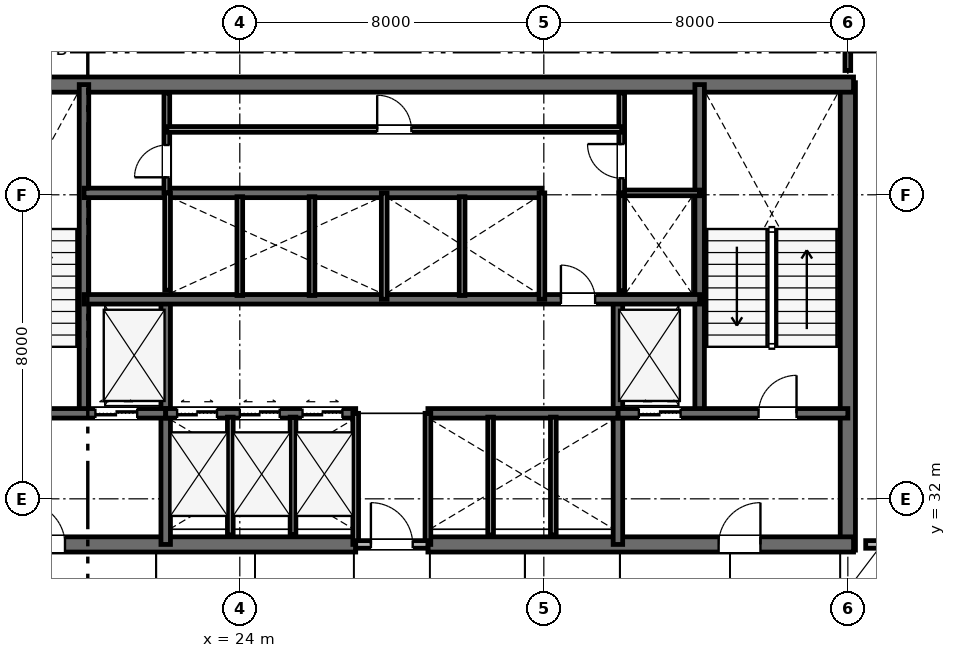
"""IFC4 building model, lengths in metres.
Left out: names, types, materials, properties, quantities, classifications, styles, units other than length and angle.
Written with IfcOpenShell. Run it as: python <this file> out.ifc"""

import sys

from ifc_helpers import new_model, si_unit, direction, frame, frame_2d, origin, place, context, subcontext, project, spatial, rectangle, extrude, element, fill, save


model = new_model("IFC4")
c1 = context("Model", 3, precision=1e-05, world=origin(), true_north=direction((0.0, 1.0)))
c2 = subcontext(c1, "Body", "Model", "MODEL_VIEW")
j1 = project(units=[si_unit("LENGTHUNIT", "METRE"), si_unit("PLANEANGLEUNIT", "RADIAN")], contexts=[c1])
p1 = place(None, origin())
s1 = spatial("IfcSite", under=j1, at=p1, CompositionType="ELEMENT")
p2 = place(p1, origin())
s2 = spatial("IfcBuilding", under=s1, at=p2, CompositionType="ELEMENT")
p3 = place(p2, frame((0.0, 0.0, 33.0)))
s3 = spatial("IfcBuildingStorey", under=s2, at=p3, CompositionType="ELEMENT", Elevation=33.0)
p4 = place(p3, frame((40.0, 30.65, 0.0), z_axis=(0.0, 0.0, 1.0), x_axis=(0.0, 1.0, 0.0)))
e1 = element("IfcWall", 1, at=p4, inside=s3, PredefinedType="SHEAR", context=c2, shape_type="SweptSolid", body=[
    extrude(rectangle(XDim=12.3, YDim=0.4, at=frame_2d((6.15, 0.0))), origin(), (0.0, 0.0, 1.0), 3.6),
])
p5 = place(p3, frame((15.85, 42.9, 0.0), z_axis=(0.0, 0.0, 1.0), x_axis=(1.0, 0.0, 0.0)))
e2 = element("IfcWall", 2, at=p5, inside=s3, PredefinedType="SHEAR", context=c2, shape_type="SweptSolid", body=[
    extrude(rectangle(XDim=24.3, YDim=0.4, at=frame_2d((12.15, 0.0))), origin(), (0.0, 0.0, 1.0), 3.6),
])
p6 = place(p3, frame((15.85, 30.8, 0.0), z_axis=(0.0, 0.0, 1.0), x_axis=(1.0, 0.0, 0.0)))
e3 = element("IfcWall", 3, at=p6, inside=s3, PredefinedType="SHEAR", context=c2, shape_type="SweptSolid", body=[
    extrude(rectangle(XDim=11.2, YDim=0.4, at=frame_2d((5.6, 0.0))), origin(), (0.0, 0.0, 1.0), 3.6),
])
p7 = place(p6, frame((2.45, 0.0, 0.0)))
e4 = element("IfcOpeningElement", 4, at=p7, cuts=e3, PredefinedType="OPENING", context=c2, shape_type="SweptSolid", body=[
    extrude(rectangle(XDim=1.1, YDim=2.15, at=frame_2d((0.55, 1.075))), frame((0.0, 0.21, 0.0), z_axis=(0.0, -1.0, 0.0), x_axis=(1.0, 0.0, 0.0)), (0.0, 0.0, 1.0), 0.42),
])
p8 = place(p3, frame((28.95, 30.8, 0.0), z_axis=(0.0, 0.0, 1.0), x_axis=(1.0, 0.0, 0.0)))
e5 = element("IfcWall", 5, at=p8, inside=s3, PredefinedType="SHEAR", context=c2, shape_type="SweptSolid", body=[
    extrude(rectangle(XDim=11.2, YDim=0.4, at=frame_2d((5.6, 0.0))), origin(), (0.0, 0.0, 1.0), 3.6),
])
p9 = place(p8, frame((7.65, 0.0, 0.0)))
e6 = element("IfcOpeningElement", 6, at=p9, cuts=e5, PredefinedType="OPENING", context=c2, shape_type="SweptSolid", body=[
    extrude(rectangle(XDim=1.1, YDim=2.15, at=frame_2d((0.55, 1.075))), frame((0.0, 0.21, 0.0), z_axis=(0.0, -1.0, 0.0), x_axis=(1.0, 0.0, 0.0)), (0.0, 0.0, 1.0), 0.42),
])
for number, where, z_axis, x_axis in (
    (7, (19.9, 34.25, 0.0), (0.0, 0.0, 1.0), (0.0, 1.0, 0.0)),
    (8, (36.1, 34.25, 0.0), (0.0, 0.0, 1.0), (0.0, 1.0, 0.0)),
):
    element("IfcWall", number, at=place(p3, frame(where, z_axis=z_axis, x_axis=x_axis)), inside=s3, PredefinedType="SHEAR", context=c2, shape_type="SweptSolid", body=[
        extrude(rectangle(XDim=8.65, YDim=0.25, at=frame_2d((4.325, 0.0))), origin(), (0.0, 0.0, 1.0), 3.6),
    ])
for number, where, z_axis, x_axis in (
    (9, (22.05, 30.8, 0.0), (0.0, 0.0, 1.0), (0.0, 1.0, 0.0)),
    (10, (33.95, 30.8, 0.0), (0.0, 0.0, 1.0), (0.0, 1.0, 0.0)),
):
    element("IfcWall", number, at=place(p3, frame(where, z_axis=z_axis, x_axis=x_axis)), inside=s3, PredefinedType="SHEAR", context=c2, shape_type="SweptSolid", body=[
        extrude(rectangle(XDim=6.45, YDim=0.25, at=frame_2d((3.225, 0.0))), origin(), (0.0, 0.0, 1.0), 3.6),
    ])
p10 = place(p3, frame((16.0, 34.25, 0.0), z_axis=(0.0, 0.0, 1.0), x_axis=(1.0, 0.0, 0.0)))
e11 = element("IfcWall", 11, at=p10, inside=s3, PredefinedType="SHEAR", context=c2, shape_type="SweptSolid", body=[
    extrude(rectangle(XDim=6.05, YDim=0.25, at=frame_2d((3.025, 0.0))), origin(), (0.0, 0.0, 1.0), 3.6),
])
p11 = place(p10, frame((1.25, 0.0, 0.0)))
e12 = element("IfcOpeningElement", 12, at=p11, cuts=e11, PredefinedType="OPENING", context=c2, shape_type="SweptSolid", body=[
    extrude(rectangle(XDim=1.0, YDim=2.15, at=frame_2d((0.5, 1.075))), frame((0.0, 0.135, 0.0), z_axis=(0.0, -1.0, 0.0), x_axis=(1.0, 0.0, 0.0)), (0.0, 0.0, 1.0), 0.27),
])
p12 = place(p10, frame((4.2, 0.0, 0.0)))
e13 = element("IfcOpeningElement", 13, at=p12, cuts=e11, PredefinedType="OPENING", context=c2, shape_type="SweptSolid", body=[
    extrude(rectangle(XDim=1.1, YDim=2.15, at=frame_2d((0.55, 1.075))), frame((0.0, 0.135, 0.0), z_axis=(0.0, -1.0, 0.0), x_axis=(1.0, 0.0, 0.0)), (0.0, 0.0, 1.0), 0.27),
])
p13 = place(p3, frame((33.95, 34.25, 0.0), z_axis=(0.0, 0.0, 1.0), x_axis=(1.0, 0.0, 0.0)))
e14 = element("IfcWall", 14, at=p13, inside=s3, PredefinedType="SHEAR", context=c2, shape_type="SweptSolid", body=[
    extrude(rectangle(XDim=6.05, YDim=0.25, at=frame_2d((3.025, 0.0))), origin(), (0.0, 0.0, 1.0), 3.6),
])
p14 = place(p13, frame((3.7, 0.0, 0.0)))
e15 = element("IfcOpeningElement", 15, at=p14, cuts=e14, PredefinedType="OPENING", context=c2, shape_type="SweptSolid", body=[
    extrude(rectangle(XDim=1.0, YDim=2.15, at=frame_2d((0.5, 1.075))), frame((0.0, 0.135, 0.0), z_axis=(0.0, -1.0, 0.0), x_axis=(1.0, 0.0, 0.0)), (0.0, 0.0, 1.0), 0.27),
])
p15 = place(p13, frame((0.55, 0.0, 0.0)))
e16 = element("IfcOpeningElement", 16, at=p15, cuts=e14, PredefinedType="OPENING", context=c2, shape_type="SweptSolid", body=[
    extrude(rectangle(XDim=1.1, YDim=2.15, at=frame_2d((0.55, 1.075))), frame((0.0, 0.135, 0.0), z_axis=(0.0, -1.0, 0.0), x_axis=(1.0, 0.0, 0.0)), (0.0, 0.0, 1.0), 0.27),
])
p16 = place(p3, frame((22.05, 34.25, 0.0), z_axis=(0.0, 0.0, 1.0), x_axis=(1.0, 0.0, 0.0)))
e17 = element("IfcWall", 17, at=p16, inside=s3, PredefinedType="SHEAR", context=c2, shape_type="SweptSolid", body=[
    extrude(rectangle(XDim=5.0, YDim=0.25, at=frame_2d((2.5, 0.0))), origin(), (0.0, 0.0, 1.0), 3.6),
])
p17 = place(p16, frame((0.3, 0.0, 0.0)))
e18 = element("IfcOpeningElement", 18, at=p17, cuts=e17, PredefinedType="OPENING", context=c2, shape_type="SweptSolid", body=[
    extrude(rectangle(XDim=1.05, YDim=2.15, at=frame_2d((0.525, 1.075))), frame((0.0, 0.135, 0.0), z_axis=(0.0, -1.0, 0.0), x_axis=(1.0, 0.0, 0.0)), (0.0, 0.0, 1.0), 0.27),
])
p18 = place(p16, frame((1.95, 0.0, 0.0)))
e19 = element("IfcOpeningElement", 19, at=p18, cuts=e17, PredefinedType="OPENING", context=c2, shape_type="SweptSolid", body=[
    extrude(rectangle(XDim=1.05, YDim=2.15, at=frame_2d((0.525, 1.075))), frame((0.0, 0.135, 0.0), z_axis=(0.0, -1.0, 0.0), x_axis=(1.0, 0.0, 0.0)), (0.0, 0.0, 1.0), 0.27),
])
p19 = place(p16, frame((3.6, 0.0, 0.0)))
e20 = element("IfcOpeningElement", 20, at=p19, cuts=e17, PredefinedType="OPENING", context=c2, shape_type="SweptSolid", body=[
    extrude(rectangle(XDim=1.05, YDim=2.15, at=frame_2d((0.525, 1.075))), frame((0.0, 0.135, 0.0), z_axis=(0.0, -1.0, 0.0), x_axis=(1.0, 0.0, 0.0)), (0.0, 0.0, 1.0), 0.27),
])
p20 = place(p3, frame((28.95, 34.25, 0.0), z_axis=(0.0, 0.0, 1.0), x_axis=(1.0, 0.0, 0.0)))
e21 = element("IfcWall", 21, at=p20, inside=s3, PredefinedType="SHEAR", context=c2, shape_type="SweptSolid", body=[
    extrude(rectangle(XDim=5.0, YDim=0.25, at=frame_2d((2.5, 0.0))), origin(), (0.0, 0.0, 1.0), 3.6),
])
p21 = place(p3, frame((19.9, 37.25, 0.0), z_axis=(0.0, 0.0, 1.0), x_axis=(1.0, 0.0, 0.0)))
e22 = element("IfcWall", 22, at=p21, inside=s3, PredefinedType="SHEAR", context=c2, shape_type="SweptSolid", body=[
    extrude(rectangle(XDim=16.2, YDim=0.25, at=frame_2d((8.1, 0.0))), origin(), (0.0, 0.0, 1.0), 3.6),
])
p22 = place(p21, frame((12.55, 0.0, 0.0)))
e23 = element("IfcOpeningElement", 23, at=p22, cuts=e22, PredefinedType="OPENING", context=c2, shape_type="SweptSolid", body=[
    extrude(rectangle(XDim=0.9, YDim=2.15, at=frame_2d((0.45, 1.075))), frame((0.0, 0.135, 0.0), z_axis=(0.0, -1.0, 0.0), x_axis=(1.0, 0.0, 0.0)), (0.0, 0.0, 1.0), 0.27),
])
p23 = place(p3, frame((19.9, 40.05, 0.0), z_axis=(0.0, 0.0, 1.0), x_axis=(1.0, 0.0, 0.0)))
e24 = element("IfcWall", 24, at=p23, inside=s3, PredefinedType="SHEAR", context=c2, shape_type="SweptSolid", body=[
    extrude(rectangle(XDim=12.05, YDim=0.25, at=frame_2d((6.025, 0.0))), origin(), (0.0, 0.0, 1.0), 3.6),
])
for number, where, z_axis, x_axis in (
    (25, (27.05, 30.8, 0.0), (0.0, 0.0, 1.0), (0.0, 1.0, 0.0)),
    (26, (28.95, 30.8, 0.0), (0.0, 0.0, 1.0), (0.0, 1.0, 0.0)),
):
    element("IfcWall", number, at=place(p3, frame(where, z_axis=z_axis, x_axis=x_axis)), inside=s3, PredefinedType="PLUMBINGWALL", context=c2, shape_type="SweptSolid", body=[
        extrude(rectangle(XDim=3.45, YDim=0.15, at=frame_2d((1.725, 0.0))), origin(), (0.0, 0.0, 1.0), 3.33),
    ])
p24 = place(p3, frame((27.05, 30.8, 0.0), z_axis=(0.0, 0.0, 1.0), x_axis=(1.0, 0.0, 0.0)))
e27 = element("IfcWall", 27, at=p24, inside=s3, PredefinedType="PARTITIONING", context=c2, shape_type="SweptSolid", body=[
    extrude(rectangle(XDim=1.9, YDim=0.2, at=frame_2d((0.95, 0.0))), origin(), (0.0, 0.0, 1.0), 3.33),
])
p25 = place(p24, frame((0.4, 0.0, 0.0)))
e28 = element("IfcOpeningElement", 28, at=p25, cuts=e27, PredefinedType="OPENING", context=c2, shape_type="SweptSolid", body=[
    extrude(rectangle(XDim=1.1, YDim=2.15, at=frame_2d((0.55, 1.075))), frame((0.0, 0.11, 0.0), z_axis=(0.0, -1.0, 0.0), x_axis=(1.0, 0.0, 0.0)), (0.0, 0.0, 1.0), 0.22),
])
for number, where, z_axis, x_axis in (
    (29, (23.75, 31.05, 0.0), (0.0, 0.0, 1.0), (0.0, 1.0, 0.0)),
    (30, (25.4, 31.05, 0.0), (0.0, 0.0, 1.0), (0.0, 1.0, 0.0)),
    (31, (30.6, 31.05, 0.0), (0.0, 0.0, 1.0), (0.0, 1.0, 0.0)),
    (32, (32.25, 31.05, 0.0), (0.0, 0.0, 1.0), (0.0, 1.0, 0.0)),
):
    element("IfcWall", number, at=place(p3, frame(where, z_axis=z_axis, x_axis=x_axis)), inside=s3, PredefinedType="PLUMBINGWALL", context=c2, shape_type="SweptSolid", body=[
        extrude(rectangle(XDim=3.1, YDim=0.15, at=frame_2d((1.55, 0.0))), origin(), (0.0, 0.0, 1.0), 3.33),
    ])
p26 = place(p3, frame((22.1, 37.49, 0.0), z_axis=(0.0, 0.0, 1.0), x_axis=(0.0, 1.0, 0.0)))
e33 = element("IfcWall", 33, at=p26, inside=s3, PredefinedType="PLUMBINGWALL", context=c2, shape_type="SweptSolid", body=[
    extrude(rectangle(XDim=2.56, YDim=0.15, at=frame_2d((1.28, 0.0))), origin(), (0.0, 0.0, 1.0), 3.33),
])
p27 = place(p3, frame((27.8, 37.25, 0.0), z_axis=(0.0, 0.0, 1.0), x_axis=(0.0, 1.0, 0.0)))
e34 = element("IfcWall", 34, at=p27, inside=s3, PredefinedType="PLUMBINGWALL", context=c2, shape_type="SweptSolid", body=[
    extrude(rectangle(XDim=2.8, YDim=0.15, at=frame_2d((1.4, 0.0))), origin(), (0.0, 0.0, 1.0), 3.33),
])
for number, where, z_axis, x_axis in (
    (35, (24.0, 37.35, 0.0), (0.0, 0.0, 1.0), (0.0, 1.0, 0.0)),
    (36, (25.9, 37.35, 0.0), (0.0, 0.0, 1.0), (0.0, 1.0, 0.0)),
):
    element("IfcWall", number, at=place(p3, frame(where, z_axis=z_axis, x_axis=x_axis)), inside=s3, PredefinedType="PLUMBINGWALL", context=c2, shape_type="SweptSolid", body=[
        extrude(rectangle(XDim=2.6, YDim=0.15, at=frame_2d((1.3, 0.0))), origin(), (0.0, 0.0, 1.0), 3.33),
    ])
p28 = place(p3, frame((31.95, 37.25, 0.0), z_axis=(0.0, 0.0, 1.0), x_axis=(0.0, 1.0, 0.0)))
e37 = element("IfcWall", 37, at=p28, inside=s3, PredefinedType="PLUMBINGWALL", context=c2, shape_type="SweptSolid", body=[
    extrude(rectangle(XDim=2.8, YDim=0.15, at=frame_2d((1.4, 0.0))), origin(), (0.0, 0.0, 1.0), 3.33),
])
p29 = place(p3, frame((29.85, 37.35, 0.0), z_axis=(0.0, 0.0, 1.0), x_axis=(0.0, 1.0, 0.0)))
e38 = element("IfcWall", 38, at=p29, inside=s3, PredefinedType="PLUMBINGWALL", context=c2, shape_type="SweptSolid", body=[
    extrude(rectangle(XDim=2.6, YDim=0.15, at=frame_2d((1.3, 0.0))), origin(), (0.0, 0.0, 1.0), 3.33),
])
p30 = place(p3, frame((34.05, 37.473, 0.0), z_axis=(0.0, 0.0, 1.0), x_axis=(0.0, 1.0, 0.0)))
e39 = element("IfcWall", 39, at=p30, inside=s3, PredefinedType="PLUMBINGWALL", context=c2, shape_type="SweptSolid", body=[
    extrude(rectangle(XDim=2.577, YDim=0.15, at=frame_2d((1.288, 0.0))), origin(), (0.0, 0.0, 1.0), 3.33),
])
p31 = place(p3, frame((34.05, 40.05, 0.0), z_axis=(0.0, 0.0, 1.0), x_axis=(1.0, 0.0, 0.0)))
e40 = element("IfcWall", 40, at=p31, inside=s3, PredefinedType="PARTITIONING", context=c2, shape_type="SweptSolid", body=[
    extrude(rectangle(XDim=2.05, YDim=0.15, at=frame_2d((1.025, 0.0))), origin(), (0.0, 0.0, 1.0), 3.33),
])
p32 = place(p3, frame((34.05, 40.05, 0.0), z_axis=(0.0, 0.0, 1.0), x_axis=(0.0, 1.0, 0.0)))
e41 = element("IfcWall", 41, at=p32, inside=s3, PredefinedType="PARTITIONING", context=c2, shape_type="SweptSolid", body=[
    extrude(rectangle(XDim=2.63, YDim=0.15, at=frame_2d((1.315, 0.0))), origin(), (0.0, 0.0, 1.0), 3.33),
])
p33 = place(p32, frame((0.385, 0.0, 0.0)))
e42 = element("IfcOpeningElement", 42, at=p33, cuts=e41, PredefinedType="OPENING", context=c2, shape_type="SweptSolid", body=[
    extrude(rectangle(XDim=0.9, YDim=2.15, at=frame_2d((0.45, 1.075))), frame((0.0, 0.085, 0.0), z_axis=(0.0, -1.0, 0.0), x_axis=(1.0, 0.0, 0.0)), (0.0, 0.0, 1.0), 0.17),
])
p34 = place(p3, frame((22.08, 40.05, 0.0), z_axis=(0.0, 0.0, 1.0), x_axis=(0.0, 1.0, 0.0)))
e43 = element("IfcWall", 43, at=p34, inside=s3, PredefinedType="PARTITIONING", context=c2, shape_type="SweptSolid", body=[
    extrude(rectangle(XDim=2.63, YDim=0.15, at=frame_2d((1.315, 0.0))), origin(), (0.0, 0.0, 1.0), 3.33),
])
p35 = place(p34, frame((0.41, 0.0, 0.0)))
e44 = element("IfcOpeningElement", 44, at=p35, cuts=e43, PredefinedType="OPENING", context=c2, shape_type="SweptSolid", body=[
    extrude(rectangle(XDim=0.85, YDim=2.15, at=frame_2d((0.425, 1.075))), frame((0.0, 0.085, 0.0), z_axis=(0.0, -1.0, 0.0), x_axis=(1.0, 0.0, 0.0)), (0.0, 0.0, 1.0), 0.17),
])
p36 = place(p3, frame((22.08, 41.72, 0.0), z_axis=(0.0, 0.0, 1.0), x_axis=(1.0, 0.0, 0.0)))
e45 = element("IfcWall", 45, at=p36, inside=s3, PredefinedType="PARTITIONING", context=c2, shape_type="SweptSolid", body=[
    extrude(rectangle(XDim=11.97, YDim=0.15, at=frame_2d((5.985, 0.0))), origin(), (0.0, 0.0, 1.0), 3.33),
])
p37 = place(p36, frame((5.535, 0.0, 0.0)))
e46 = element("IfcOpeningElement", 46, at=p37, cuts=e45, PredefinedType="OPENING", context=c2, shape_type="SweptSolid", body=[
    extrude(rectangle(XDim=0.9, YDim=2.15, at=frame_2d((0.45, 1.075))), frame((0.0, 0.085, 0.0), z_axis=(0.0, -1.0, 0.0), x_axis=(1.0, 0.0, 0.0)), (0.0, 0.0, 1.0), 0.17),
])
p38 = place(p3, frame((40.0, 43.27, 0.0), z_axis=(0.0, 0.0, 1.0), x_axis=(0.0, 1.0, 0.0)))
e47 = element("IfcWall", 47, at=p38, inside=s3, PredefinedType="PARTITIONING", context=c2, shape_type="SweptSolid", body=[
    extrude(rectangle(XDim=4.63, YDim=0.15, at=frame_2d((2.315, 0.0))), origin(), (0.0, 0.0, 1.0), 2.87),
])
p39 = place(p3, frame((40.47, 30.8, 0.0), z_axis=(0.0, 0.0, 1.0), x_axis=(1.0, 0.0, 0.0)))
e48 = element("IfcWall", 48, at=p39, inside=s3, PredefinedType="PARTITIONING", context=c2, shape_type="SweptSolid", body=[
    extrude(rectangle(XDim=15.43, YDim=0.2, at=frame_2d((7.715, 0.0))), origin(), (0.0, 0.0, 1.0), 2.68),
])
p40 = place(p39, frame((6.673, 0.0, 0.0)))
e49 = element("IfcOpeningElement", 49, at=p40, cuts=e48, PredefinedType="OPENING", context=c2, shape_type="SweptSolid", body=[
    extrude(rectangle(XDim=0.95, YDim=2.15, at=frame_2d((0.475, 1.075))), frame((0.0, 0.11, 0.0), z_axis=(0.0, -1.0, 0.0), x_axis=(1.0, 0.0, 0.0)), (0.0, 0.0, 1.0), 0.22),
])
p41 = place(p25, origin())
e50 = element("IfcDoor", 50, at=p41, inside=s3, OperationType="SINGLE_SWING_LEFT", PredefinedType="DOOR", context=c2, shape_type="SweptSolid", body=[
    extrude(rectangle(XDim=1.1, YDim=2.15, at=frame_2d((0.55, 1.075))), frame((0.0, 0.025, 0.0), z_axis=(0.0, -1.0, 0.0), x_axis=(1.0, 0.0, 0.0)), (0.0, 0.0, 1.0), 0.05),
])
fill(e28, e50)
p42 = place(p14, origin())
e51 = element("IfcDoor", 51, at=p42, inside=s3, OperationType="SINGLE_SWING_RIGHT", PredefinedType="DOOR", context=c2, shape_type="SweptSolid", body=[
    extrude(rectangle(XDim=1.0, YDim=2.15, at=frame_2d((0.5, 1.075))), frame((0.0, 0.025, 0.0), z_axis=(0.0, -1.0, 0.0), x_axis=(1.0, 0.0, 0.0)), (0.0, 0.0, 1.0), 0.05),
])
fill(e15, e51)
p43 = place(p7, origin())
e52 = element("IfcDoor", 52, at=p43, inside=s3, OperationType="SINGLE_SWING_LEFT", PredefinedType="DOOR", context=c2, shape_type="SweptSolid", body=[
    extrude(rectangle(XDim=1.1, YDim=2.15, at=frame_2d((0.55, 1.075))), frame((0.0, 0.025, 0.0), z_axis=(0.0, -1.0, 0.0), x_axis=(1.0, 0.0, 0.0)), (0.0, 0.0, 1.0), 0.05),
])
fill(e4, e52)
p44 = place(p9, origin())
e53 = element("IfcDoor", 53, at=p44, inside=s3, OperationType="SINGLE_SWING_RIGHT", PredefinedType="DOOR", context=c2, shape_type="SweptSolid", body=[
    extrude(rectangle(XDim=1.1, YDim=2.15, at=frame_2d((0.55, 1.075))), frame((0.0, 0.025, 0.0), z_axis=(0.0, -1.0, 0.0), x_axis=(1.0, 0.0, 0.0)), (0.0, 0.0, 1.0), 0.05),
])
fill(e6, e53)
p45 = place(p22, origin())
e54 = element("IfcDoor", 54, at=p45, inside=s3, OperationType="SINGLE_SWING_LEFT", PredefinedType="DOOR", context=c2, shape_type="SweptSolid", body=[
    extrude(rectangle(XDim=0.9, YDim=2.15, at=frame_2d((0.45, 1.075))), frame((0.0, 0.025, 0.0), z_axis=(0.0, -1.0, 0.0), x_axis=(1.0, 0.0, 0.0)), (0.0, 0.0, 1.0), 0.05),
])
fill(e23, e54)
p46 = place(p33, origin())
e55 = element("IfcDoor", 55, at=p46, inside=s3, OperationType="SINGLE_SWING_RIGHT", PredefinedType="DOOR", context=c2, shape_type="SweptSolid", body=[
    extrude(rectangle(XDim=0.9, YDim=2.15, at=frame_2d((0.45, 1.075))), frame((0.0, 0.025, 0.0), z_axis=(0.0, -1.0, 0.0), x_axis=(1.0, 0.0, 0.0)), (0.0, 0.0, 1.0), 0.05),
])
fill(e42, e55)
p47 = place(p35, origin())
e56 = element("IfcDoor", 56, at=p47, inside=s3, OperationType="SINGLE_SWING_LEFT", PredefinedType="DOOR", context=c2, shape_type="SweptSolid", body=[
    extrude(rectangle(XDim=0.85, YDim=2.15, at=frame_2d((0.425, 1.075))), frame((0.0, 0.025, 0.0), z_axis=(0.0, -1.0, 0.0), x_axis=(1.0, 0.0, 0.0)), (0.0, 0.0, 1.0), 0.05),
])
fill(e44, e56)
p48 = place(p37, origin())
e57 = element("IfcDoor", 57, at=p48, inside=s3, OperationType="SINGLE_SWING_LEFT", PredefinedType="DOOR", context=c2, shape_type="SweptSolid", body=[
    extrude(rectangle(XDim=0.9, YDim=2.15, at=frame_2d((0.45, 1.075))), frame((0.0, 0.025, 0.0), z_axis=(0.0, -1.0, 0.0), x_axis=(1.0, 0.0, 0.0)), (0.0, 0.0, 1.0), 0.05),
])
fill(e46, e57)
p49 = place(p12, origin())
e58 = element("IfcDoor", 58, at=p49, inside=s3, OperationType="DOUBLE_DOOR_SLIDING", PredefinedType="DOOR", context=c2, shape_type="SweptSolid", body=[
    extrude(rectangle(XDim=1.1, YDim=2.15, at=frame_2d((0.55, 1.075))), frame((0.0, 0.025, 0.0), z_axis=(0.0, -1.0, 0.0), x_axis=(1.0, 0.0, 0.0)), (0.0, 0.0, 1.0), 0.05),
])
fill(e13, e58)
p50 = place(p15, origin())
e59 = element("IfcDoor", 59, at=p50, inside=s3, OperationType="DOUBLE_DOOR_SLIDING", PredefinedType="DOOR", context=c2, shape_type="SweptSolid", body=[
    extrude(rectangle(XDim=1.1, YDim=2.15, at=frame_2d((0.55, 1.075))), frame((0.0, 0.025, 0.0), z_axis=(0.0, -1.0, 0.0), x_axis=(1.0, 0.0, 0.0)), (0.0, 0.0, 1.0), 0.05),
])
fill(e16, e59)
p51 = place(p17, origin())
e60 = element("IfcDoor", 60, at=p51, inside=s3, OperationType="DOUBLE_DOOR_SLIDING", PredefinedType="DOOR", context=c2, shape_type="SweptSolid", body=[
    extrude(rectangle(XDim=1.05, YDim=2.15, at=frame_2d((0.525, 1.075))), frame((0.0, 0.025, 0.0), z_axis=(0.0, -1.0, 0.0), x_axis=(1.0, 0.0, 0.0)), (0.0, 0.0, 1.0), 0.05),
])
fill(e18, e60)
p52 = place(p18, origin())
e61 = element("IfcDoor", 61, at=p52, inside=s3, OperationType="DOUBLE_DOOR_SLIDING", PredefinedType="DOOR", context=c2, shape_type="SweptSolid", body=[
    extrude(rectangle(XDim=1.05, YDim=2.15, at=frame_2d((0.525, 1.075))), frame((0.0, 0.025, 0.0), z_axis=(0.0, -1.0, 0.0), x_axis=(1.0, 0.0, 0.0)), (0.0, 0.0, 1.0), 0.05),
])
fill(e19, e61)
p53 = place(p19, origin())
e62 = element("IfcDoor", 62, at=p53, inside=s3, OperationType="DOUBLE_DOOR_SLIDING", PredefinedType="DOOR", context=c2, shape_type="SweptSolid", body=[
    extrude(rectangle(XDim=1.05, YDim=2.15, at=frame_2d((0.525, 1.075))), frame((0.0, 0.025, 0.0), z_axis=(0.0, -1.0, 0.0), x_axis=(1.0, 0.0, 0.0)), (0.0, 0.0, 1.0), 0.05),
])
fill(e20, e62)
save(model, sys.argv[1])
